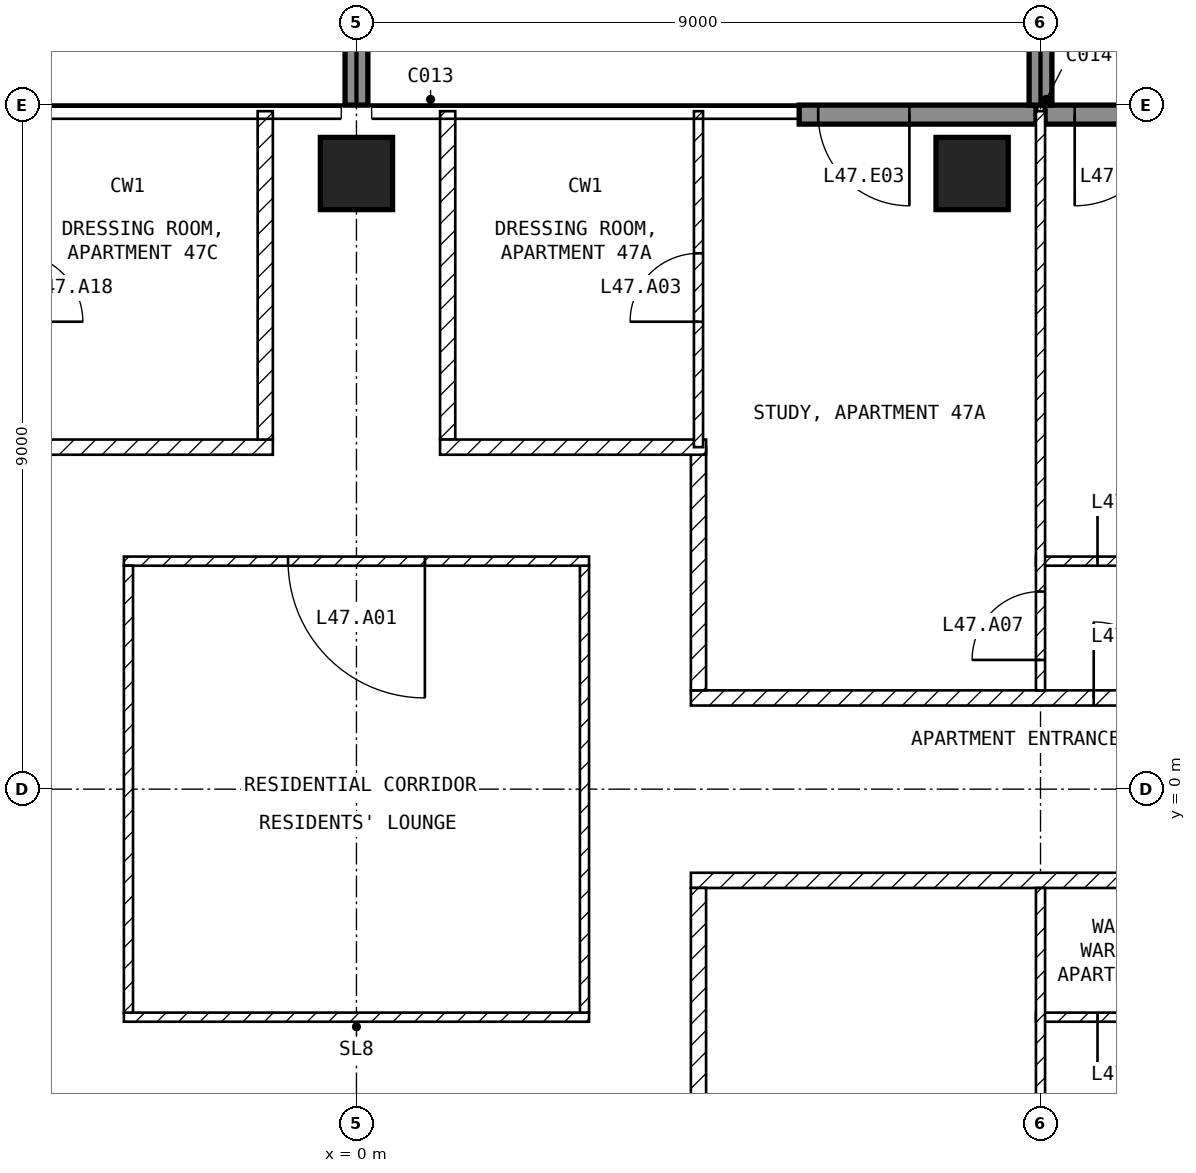
"""IFC4 building model, lengths in metres.
Left out: names, types, materials, properties, quantities, classifications, styles, units other than length and angle.
Written with IfcOpenShell. Run it as: python <this file> out.ifc"""

import sys

from ifc_helpers import new_model, si_unit, direction, frame, frame_2d, origin, origin_2d, place, context, subcontext, project, spatial, rectangle, extrude, element, fill, save


model = new_model("IFC4")
c1 = context("Model", 3, precision=1e-05, world=origin(), true_north=direction((0.0, 1.0)))
c2 = subcontext(c1, "Body", "Model", "MODEL_VIEW")
j1 = project(units=[si_unit("LENGTHUNIT", "METRE"), si_unit("PLANEANGLEUNIT", "RADIAN")], contexts=[c1])
p1 = place(None, origin())
s1 = spatial("IfcSite", under=j1, at=p1, CompositionType="ELEMENT")
p2 = place(p1, origin())
s2 = spatial("IfcBuilding", under=s1, at=p2, CompositionType="ELEMENT")
p3 = place(p2, frame((0.0, 0.0, 191.1)))
s3 = spatial("IfcBuildingStorey", under=s2, at=p3, CompositionType="ELEMENT", Elevation=191.1)
for number, where, z_axis, x_axis in (
    (1, (0.0, 8.1, -0.25), (0.0, 0.0, 1.0), (1.0, 0.0, 0.0)),
    (2, (8.1, 8.1, -0.25), (0.0, 0.0, 1.0), (1.0, 0.0, 0.0)),
):
    element("IfcColumn", number, at=place(p3, frame(where, z_axis=z_axis, x_axis=x_axis)), inside=s3, PredefinedType="COLUMN", context=c2, shape_type="SweptSolid", body=[
        extrude(rectangle(XDim=0.95, YDim=0.95, at=origin_2d()), origin(), (0.0, 0.0, 1.0), 3.5),
    ])
p4 = place(p3, frame((10.9, 8.875, 0.0), z_axis=(0.0, 0.0, 1.0), x_axis=(-1.0, 0.0, 0.0)))
e3 = element("IfcWall", 3, at=p4, inside=s3, PredefinedType="SOLIDWALL", context=c2, shape_type="SweptSolid", body=[
    extrude(rectangle(XDim=1.84, YDim=0.25, at=frame_2d((0.92, 0.0))), origin(), (0.0, 0.0, 1.0), 3.25),
])
p5 = place(p4, frame((0.25, 0.0, 0.0)))
e4 = element("IfcOpeningElement", 4, at=p5, cuts=e3, PredefinedType="OPENING", context=c2, shape_type="SweptSolid", body=[
    extrude(rectangle(XDim=1.2, YDim=2.4, at=frame_2d((0.6, 1.2))), frame((0.0, 0.135, 0.0), z_axis=(0.0, -1.0, 0.0), x_axis=(1.0, 0.0, 0.0)), (0.0, 0.0, 1.0), 0.27),
])
p6 = place(p3, frame((8.94, 8.875, 0.0), z_axis=(0.0, 0.0, 1.0), x_axis=(-1.0, 0.0, 0.0)))
e5 = element("IfcWall", 5, at=p6, inside=s3, PredefinedType="SOLIDWALL", context=c2, shape_type="SweptSolid", body=[
    extrude(rectangle(XDim=3.115, YDim=0.25, at=frame_2d((1.558, 0.0))), origin(), (0.0, 0.0, 1.0), 3.25),
])
p7 = place(p6, frame((1.665, 0.0, 0.0)))
e6 = element("IfcOpeningElement", 6, at=p7, cuts=e5, PredefinedType="OPENING", context=c2, shape_type="SweptSolid", body=[
    extrude(rectangle(XDim=1.2, YDim=2.4, at=frame_2d((0.6, 1.2))), frame((0.0, 0.135, 0.0), z_axis=(0.0, -1.0, 0.0), x_axis=(1.0, 0.0, 0.0)), (0.0, 0.0, 1.0), 0.27),
])
for number, where, z_axis, x_axis in (
    (7, (0.0, 9.0, 0.0), (0.0, 0.0, 1.0), (0.0, 1.0, 0.0)),
    (8, (9.0, 9.0, 0.0), (0.0, 0.0, 1.0), (0.0, 1.0, 0.0)),
):
    element("IfcWall", number, at=place(p3, frame(where, z_axis=z_axis, x_axis=x_axis)), inside=s3, PredefinedType="SOLIDWALL", context=c2, shape_type="SweptSolid", body=[
        extrude(rectangle(XDim=2.7, YDim=0.3, at=frame_2d((1.35, 0.0))), origin(), (0.0, 0.0, 1.0), 3.25),
    ])
p8 = place(p3, frame((-3.06, -3.0, 0.0), z_axis=(0.0, 0.0, 1.0), x_axis=(1.0, 0.0, 0.0)))
e9 = element("IfcWall", 9, at=p8, inside=s3, PredefinedType="PARTITIONING", context=c2, shape_type="SweptSolid", body=[
    extrude(rectangle(XDim=6.12, YDim=0.12, at=frame_2d((3.06, 0.0))), origin(), (0.0, 0.0, 1.0), 3.25),
])
p9 = place(p3, frame((3.0, -2.94, 0.0), z_axis=(0.0, 0.0, 1.0), x_axis=(0.0, 1.0, 0.0)))
e10 = element("IfcWall", 10, at=p9, inside=s3, PredefinedType="PARTITIONING", context=c2, shape_type="SweptSolid", body=[
    extrude(rectangle(XDim=5.88, YDim=0.12, at=frame_2d((2.94, 0.0))), origin(), (0.0, 0.0, 1.0), 3.25),
])
p10 = place(p3, frame((3.06, 3.0, 0.0), z_axis=(0.0, 0.0, 1.0), x_axis=(-1.0, 0.0, 0.0)))
e11 = element("IfcWall", 11, at=p10, inside=s3, PredefinedType="PARTITIONING", context=c2, shape_type="SweptSolid", body=[
    extrude(rectangle(XDim=6.12, YDim=0.12, at=frame_2d((3.06, 0.0))), origin(), (0.0, 0.0, 1.0), 3.25),
])
p11 = place(p10, frame((2.16, 0.0, 0.0)))
e12 = element("IfcOpeningElement", 12, at=p11, cuts=e11, PredefinedType="OPENING", context=c2, shape_type="SweptSolid", body=[
    extrude(rectangle(XDim=1.8, YDim=2.1, at=frame_2d((0.9, 1.05))), frame((0.0, 0.07, 0.0), z_axis=(0.0, -1.0, 0.0), x_axis=(1.0, 0.0, 0.0)), (0.0, 0.0, 1.0), 0.14),
])
p12 = place(p3, frame((-3.0, 2.94, 0.0), z_axis=(0.0, 0.0, 1.0), x_axis=(0.0, -1.0, 0.0)))
e13 = element("IfcWall", 13, at=p12, inside=s3, PredefinedType="PARTITIONING", context=c2, shape_type="SweptSolid", body=[
    extrude(rectangle(XDim=5.88, YDim=0.12, at=frame_2d((2.94, 0.0))), origin(), (0.0, 0.0, 1.0), 3.25),
])
p13 = place(p3, frame((4.4, 1.2, 0.0), z_axis=(0.0, 0.0, 1.0), x_axis=(1.0, 0.0, 0.0)))
e14 = element("IfcWall", 14, at=p13, inside=s3, PredefinedType="PARTITIONING", context=c2, shape_type="SweptSolid", body=[
    extrude(rectangle(XDim=17.2, YDim=0.2, at=frame_2d((8.6, 0.0))), origin(), (0.0, 0.0, 1.0), 3.25),
])
p14 = place(p13, frame((5.3, 0.0, 0.0)))
e15 = element("IfcOpeningElement", 15, at=p14, cuts=e14, PredefinedType="OPENING", context=c2, shape_type="SweptSolid", body=[
    extrude(rectangle(XDim=1.0, YDim=2.1, at=frame_2d((0.5, 1.05))), frame((0.0, 0.11, 0.0), z_axis=(0.0, -1.0, 0.0), x_axis=(1.0, 0.0, 0.0)), (0.0, 0.0, 1.0), 0.22),
])
p15 = place(p3, frame((4.5, 4.5, 0.0), z_axis=(0.0, 0.0, 1.0), x_axis=(0.0, -1.0, 0.0)))
e16 = element("IfcWall", 16, at=p15, inside=s3, PredefinedType="PARTITIONING", context=c2, shape_type="SweptSolid", body=[
    extrude(rectangle(XDim=3.2, YDim=0.2, at=frame_2d((1.6, 0.0))), origin(), (0.0, 0.0, 1.0), 3.25),
])
p16 = place(p3, frame((1.2, 8.92, 0.0), z_axis=(0.0, 0.0, 1.0), x_axis=(0.0, -1.0, 0.0)))
e17 = element("IfcWall", 17, at=p16, inside=s3, PredefinedType="PARTITIONING", context=c2, shape_type="SweptSolid", body=[
    extrude(rectangle(XDim=4.32, YDim=0.2, at=frame_2d((2.16, 0.0))), origin(), (0.0, 0.0, 1.0), 3.25),
])
p17 = place(p3, frame((1.1, 4.5, 0.0), z_axis=(0.0, 0.0, 1.0), x_axis=(1.0, 0.0, 0.0)))
e18 = element("IfcWall", 18, at=p17, inside=s3, PredefinedType="PARTITIONING", context=c2, shape_type="SweptSolid", body=[
    extrude(rectangle(XDim=3.5, YDim=0.2, at=frame_2d((1.75, 0.0))), origin(), (0.0, 0.0, 1.0), 3.25),
])
p18 = place(p3, frame((21.6, -1.2, 0.0), z_axis=(0.0, 0.0, 1.0), x_axis=(-1.0, 0.0, 0.0)))
e19 = element("IfcWall", 19, at=p18, inside=s3, PredefinedType="PARTITIONING", context=c2, shape_type="SweptSolid", body=[
    extrude(rectangle(XDim=17.2, YDim=0.2, at=frame_2d((8.6, 0.0))), origin(), (0.0, 0.0, 1.0), 3.25),
])
p19 = place(p18, frame((6.1, 0.0, 0.0)))
e20 = element("IfcOpeningElement", 20, at=p19, cuts=e19, PredefinedType="OPENING", context=c2, shape_type="SweptSolid", body=[
    extrude(rectangle(XDim=1.0, YDim=2.1, at=frame_2d((0.5, 1.05))), frame((0.0, 0.11, 0.0), z_axis=(0.0, -1.0, 0.0), x_axis=(1.0, 0.0, 0.0)), (0.0, 0.0, 1.0), 0.22),
])
p20 = place(p3, frame((4.5, -1.3, 0.0), z_axis=(0.0, 0.0, 1.0), x_axis=(0.0, -1.0, 0.0)))
e21 = element("IfcWall", 21, at=p20, inside=s3, PredefinedType="PARTITIONING", context=c2, shape_type="SweptSolid", body=[
    extrude(rectangle(XDim=3.2, YDim=0.2, at=frame_2d((1.6, 0.0))), origin(), (0.0, 0.0, 1.0), 3.25),
])
p21 = place(p3, frame((-4.6, 4.5, 0.0), z_axis=(0.0, 0.0, 1.0), x_axis=(1.0, 0.0, 0.0)))
e22 = element("IfcWall", 22, at=p21, inside=s3, PredefinedType="PARTITIONING", context=c2, shape_type="SweptSolid", body=[
    extrude(rectangle(XDim=3.5, YDim=0.2, at=frame_2d((1.75, 0.0))), origin(), (0.0, 0.0, 1.0), 3.25),
])
p22 = place(p3, frame((-1.2, 4.6, 0.0), z_axis=(0.0, 0.0, 1.0), x_axis=(0.0, 1.0, 0.0)))
e23 = element("IfcWall", 23, at=p22, inside=s3, PredefinedType="PARTITIONING", context=c2, shape_type="SweptSolid", body=[
    extrude(rectangle(XDim=4.32, YDim=0.2, at=frame_2d((2.16, 0.0))), origin(), (0.0, 0.0, 1.0), 3.25),
])
p23 = place(p3, frame((8.94, 3.0, 0.0), z_axis=(0.0, 0.0, 1.0), x_axis=(1.0, 0.0, 0.0)))
e24 = element("IfcWall", 24, at=p23, inside=s3, PredefinedType="PARTITIONING", context=c2, shape_type="SweptSolid", body=[
    extrude(rectangle(XDim=5.46, YDim=0.12, at=frame_2d((2.73, 0.0))), origin(), (0.0, 0.0, 1.0), 3.25),
])
p24 = place(p23, frame((0.81, 0.0, 0.0)))
e25 = element("IfcOpeningElement", 25, at=p24, cuts=e24, PredefinedType="OPENING", context=c2, shape_type="SweptSolid", body=[
    extrude(rectangle(XDim=0.9, YDim=2.1, at=frame_2d((0.45, 1.05))), frame((0.0, 0.07, 0.0), z_axis=(0.0, -1.0, 0.0), x_axis=(1.0, 0.0, 0.0)), (0.0, 0.0, 1.0), 0.14),
])
p25 = place(p3, frame((9.0, 1.3, 0.0), z_axis=(0.0, 0.0, 1.0), x_axis=(0.0, 1.0, 0.0)))
e26 = element("IfcWall", 26, at=p25, inside=s3, PredefinedType="PARTITIONING", context=c2, shape_type="SweptSolid", body=[
    extrude(rectangle(XDim=7.62, YDim=0.12, at=frame_2d((3.81, 0.0))), origin(), (0.0, 0.0, 1.0), 3.25),
])
p26 = place(p25, frame((0.4, 0.0, 0.0)))
e27 = element("IfcOpeningElement", 27, at=p26, cuts=e26, PredefinedType="OPENING", context=c2, shape_type="SweptSolid", body=[
    extrude(rectangle(XDim=0.9, YDim=2.1, at=frame_2d((0.45, 1.05))), frame((0.0, 0.07, 0.0), z_axis=(0.0, -1.0, 0.0), x_axis=(1.0, 0.0, 0.0)), (0.0, 0.0, 1.0), 0.14),
])
p27 = place(p3, frame((4.5, 4.5, 0.0), z_axis=(0.0, 0.0, 1.0), x_axis=(0.0, 1.0, 0.0)))
e28 = element("IfcWall", 28, at=p27, inside=s3, PredefinedType="PARTITIONING", context=c2, shape_type="SweptSolid", body=[
    extrude(rectangle(XDim=4.42, YDim=0.12, at=frame_2d((2.21, 0.0))), origin(), (0.0, 0.0, 1.0), 3.25),
])
p28 = place(p27, frame((1.65, 0.0, 0.0)))
e29 = element("IfcOpeningElement", 29, at=p28, cuts=e28, PredefinedType="OPENING", context=c2, shape_type="SweptSolid", body=[
    extrude(rectangle(XDim=0.9, YDim=2.1, at=frame_2d((0.45, 1.05))), frame((0.0, 0.07, 0.0), z_axis=(0.0, -1.0, 0.0), x_axis=(1.0, 0.0, 0.0)), (0.0, 0.0, 1.0), 0.14),
])
p29 = place(p3, frame((11.4, -3.0, 0.0), z_axis=(0.0, 0.0, 1.0), x_axis=(-1.0, 0.0, 0.0)))
e30 = element("IfcWall", 30, at=p29, inside=s3, PredefinedType="PARTITIONING", context=c2, shape_type="SweptSolid", body=[
    extrude(rectangle(XDim=2.46, YDim=0.12, at=frame_2d((1.23, 0.0))), origin(), (0.0, 0.0, 1.0), 3.25),
])
p30 = place(p29, frame((0.75, 0.0, 0.0)))
e31 = element("IfcOpeningElement", 31, at=p30, cuts=e30, PredefinedType="OPENING", context=c2, shape_type="SweptSolid", body=[
    extrude(rectangle(XDim=0.9, YDim=2.1, at=frame_2d((0.45, 1.05))), frame((0.0, 0.07, 0.0), z_axis=(0.0, -1.0, 0.0), x_axis=(1.0, 0.0, 0.0)), (0.0, 0.0, 1.0), 0.14),
])
p31 = place(p3, frame((9.0, -8.92, 0.0), z_axis=(0.0, 0.0, 1.0), x_axis=(0.0, 1.0, 0.0)))
e32 = element("IfcWall", 32, at=p31, inside=s3, PredefinedType="PARTITIONING", context=c2, shape_type="SweptSolid", body=[
    extrude(rectangle(XDim=7.62, YDim=0.12, at=frame_2d((3.81, 0.0))), origin(), (0.0, 0.0, 1.0), 3.25),
])
p32 = place(p31, frame((2.62, 0.0, 0.0)))
e33 = element("IfcOpeningElement", 33, at=p32, cuts=e32, PredefinedType="OPENING", context=c2, shape_type="SweptSolid", body=[
    extrude(rectangle(XDim=0.9, YDim=2.1, at=frame_2d((0.45, 1.05))), frame((0.0, 0.07, 0.0), z_axis=(0.0, -1.0, 0.0), x_axis=(1.0, 0.0, 0.0)), (0.0, 0.0, 1.0), 0.14),
])
p33 = place(p5, origin())
e34 = element("IfcDoor", 34, at=p33, inside=s3, OperationType="SINGLE_SWING_RIGHT", PredefinedType="DOOR", context=c2, shape_type="SweptSolid", body=[
    extrude(rectangle(XDim=1.2, YDim=2.4, at=frame_2d((0.6, 1.2))), frame((0.0, 0.025, 0.0), z_axis=(0.0, -1.0, 0.0), x_axis=(1.0, 0.0, 0.0)), (0.0, 0.0, 1.0), 0.05),
])
fill(e4, e34)
p34 = place(p7, origin())
e35 = element("IfcDoor", 35, at=p34, inside=s3, OperationType="SINGLE_SWING_LEFT", PredefinedType="DOOR", context=c2, shape_type="SweptSolid", body=[
    extrude(rectangle(XDim=1.2, YDim=2.4, at=frame_2d((0.6, 1.2))), frame((0.0, 0.025, 0.0), z_axis=(0.0, -1.0, 0.0), x_axis=(1.0, 0.0, 0.0)), (0.0, 0.0, 1.0), 0.05),
])
fill(e6, e35)
p35 = place(p11, origin())
e36 = element("IfcDoor", 36, at=p35, inside=s3, OperationType="SINGLE_SWING_LEFT", PredefinedType="DOOR", context=c2, shape_type="SweptSolid", body=[
    extrude(rectangle(XDim=1.8, YDim=2.1, at=frame_2d((0.9, 1.05))), frame((0.0, 0.025, 0.0), z_axis=(0.0, -1.0, 0.0), x_axis=(1.0, 0.0, 0.0)), (0.0, 0.0, 1.0), 0.05),
])
fill(e12, e36)
p36 = place(p28, origin())
e37 = element("IfcDoor", 37, at=p36, inside=s3, OperationType="SINGLE_SWING_LEFT", PredefinedType="DOOR", context=c2, shape_type="SweptSolid", body=[
    extrude(rectangle(XDim=0.9, YDim=2.1, at=frame_2d((0.45, 1.05))), frame((0.0, 0.025, 0.0), z_axis=(0.0, -1.0, 0.0), x_axis=(1.0, 0.0, 0.0)), (0.0, 0.0, 1.0), 0.05),
])
fill(e29, e37)
p37 = place(p24, origin())
e38 = element("IfcDoor", 38, at=p37, inside=s3, OperationType="SINGLE_SWING_LEFT", PredefinedType="DOOR", context=c2, shape_type="SweptSolid", body=[
    extrude(rectangle(XDim=0.9, YDim=2.1, at=frame_2d((0.45, 1.05))), frame((0.0, 0.025, 0.0), z_axis=(0.0, -1.0, 0.0), x_axis=(1.0, 0.0, 0.0)), (0.0, 0.0, 1.0), 0.05),
])
fill(e25, e38)
p38 = place(p26, origin())
e39 = element("IfcDoor", 39, at=p38, inside=s3, OperationType="SINGLE_SWING_LEFT", PredefinedType="DOOR", context=c2, shape_type="SweptSolid", body=[
    extrude(rectangle(XDim=0.9, YDim=2.1, at=frame_2d((0.45, 1.05))), frame((0.0, 0.025, 0.0), z_axis=(0.0, -1.0, 0.0), x_axis=(1.0, 0.0, 0.0)), (0.0, 0.0, 1.0), 0.05),
])
fill(e27, e39)
p39 = place(p30, origin())
e40 = element("IfcDoor", 40, at=p39, inside=s3, OperationType="SINGLE_SWING_RIGHT", PredefinedType="DOOR", context=c2, shape_type="SweptSolid", body=[
    extrude(rectangle(XDim=0.9, YDim=2.1, at=frame_2d((0.45, 1.05))), frame((0.0, 0.025, 0.0), z_axis=(0.0, -1.0, 0.0), x_axis=(1.0, 0.0, 0.0)), (0.0, 0.0, 1.0), 0.05),
])
fill(e31, e40)
p40 = place(p14, origin())
e41 = element("IfcDoor", 41, at=p40, inside=s3, OperationType="SINGLE_SWING_LEFT", PredefinedType="DOOR", context=c2, shape_type="SweptSolid", body=[
    extrude(rectangle(XDim=1.0, YDim=2.1, at=frame_2d((0.5, 1.05))), frame((0.0, 0.025, 0.0), z_axis=(0.0, -1.0, 0.0), x_axis=(1.0, 0.0, 0.0)), (0.0, 0.0, 1.0), 0.05),
])
fill(e15, e41)
save(model, sys.argv[1])
